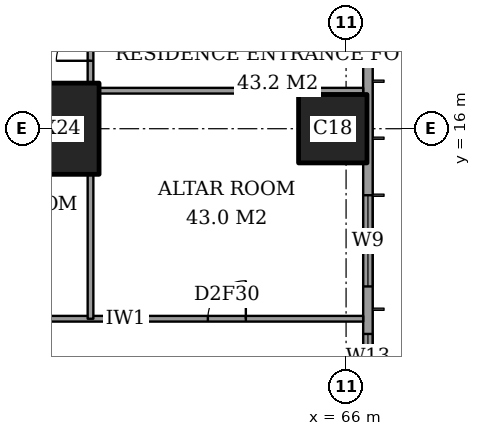
"""IFC4 building model, lengths in metres.
Left out: names, types, materials, properties, quantities, classifications, styles, units other than length and angle.
Written with IfcOpenShell. Run it as: python <this file> out.ifc"""

import sys

from ifc_helpers import new_model, si_unit, direction, frame, frame_2d, origin, origin_2d, place, context, subcontext, project, spatial, rectangle, extrude, element, fill, save


model = new_model("IFC4")
c1 = context("Model", 3, precision=1e-05, world=origin(), true_north=direction((0.0, 1.0)))
c2 = subcontext(c1, "Body", "Model", "MODEL_VIEW")
j1 = project(units=[si_unit("LENGTHUNIT", "METRE"), si_unit("PLANEANGLEUNIT", "RADIAN")], contexts=[c1])
p1 = place(None, origin())
s1 = spatial("IfcSite", under=j1, at=p1, CompositionType="ELEMENT")
p2 = place(p1, origin())
s2 = spatial("IfcBuilding", under=s1, at=p2, CompositionType="ELEMENT")
p3 = place(p2, frame((0.0, 0.0, 211.0)))
s3 = spatial("IfcBuildingStorey", under=s2, at=p3, CompositionType="ELEMENT", Elevation=211.0)
p4 = place(p3, frame((58.0, 16.0, 0.0), z_axis=(0.0, 0.0, 1.0), x_axis=(1.0, 0.0, 0.0)))
e1 = element("IfcColumn", 1, at=p4, inside=s3, PredefinedType="COLUMN", context=c2, shape_type="SweptSolid", body=[
    extrude(rectangle(XDim=3.0, YDim=2.4, at=origin_2d()), origin(), (0.0, 0.0, 1.0), 3.6),
])
p5 = place(p3, frame((65.65, 16.0, 0.0), z_axis=(0.0, 0.0, 1.0), x_axis=(1.0, 0.0, 0.0)))
e2 = element("IfcColumn", 2, at=p5, inside=s3, PredefinedType="COLUMN", context=c2, shape_type="SweptSolid", body=[
    extrude(rectangle(XDim=1.8, YDim=1.8, at=origin_2d()), origin(), (0.0, 0.0, 1.0), 3.6),
])
p6 = place(p3, frame((66.575, 3.175, 0.0), z_axis=(0.0, 0.0, 1.0), x_axis=(0.0, 1.0, 0.0)))
e3 = element("IfcWall", 3, at=p6, inside=s3, PredefinedType="SOLIDWALL", context=c2, shape_type="SweptSolid", body=[
    extrude(rectangle(XDim=41.65, YDim=0.25, at=frame_2d((20.825, 0.0))), origin(), (0.0, 0.0, 1.0), 3.6),
])
p7 = place(p6, frame((0.825, 0.0, 0.2)))
e4 = element("IfcOpeningElement", 4, at=p7, cuts=e3, PredefinedType="OPENING", context=c2, shape_type="SweptSolid", body=[
    extrude(rectangle(XDim=2.4, YDim=2.4, at=frame_2d((1.2, 1.2))), frame((0.0, 0.135, 0.0), z_axis=(0.0, -1.0, 0.0), x_axis=(1.0, 0.0, 0.0)), (0.0, 0.0, 1.0), 0.27),
])
p8 = place(p6, frame((6.225, 0.0, 0.2)))
e5 = element("IfcOpeningElement", 5, at=p8, cuts=e3, PredefinedType="OPENING", context=c2, shape_type="SweptSolid", body=[
    extrude(rectangle(XDim=1.2, YDim=2.4, at=frame_2d((0.6, 1.2))), frame((0.0, 0.135, 0.0), z_axis=(0.0, -1.0, 0.0), x_axis=(1.0, 0.0, 0.0)), (0.0, 0.0, 1.0), 0.27),
])
p9 = place(p6, frame((8.675, 0.0, 0.2)))
e6 = element("IfcOpeningElement", 6, at=p9, cuts=e3, PredefinedType="OPENING", context=c2, shape_type="SweptSolid", body=[
    extrude(rectangle(XDim=2.4, YDim=2.4, at=frame_2d((1.2, 1.2))), frame((0.0, 0.135, 0.0), z_axis=(0.0, -1.0, 0.0), x_axis=(1.0, 0.0, 0.0)), (0.0, 0.0, 1.0), 0.27),
])
p10 = place(p6, frame((15.675, 0.0, 0.2)))
e7 = element("IfcOpeningElement", 7, at=p10, cuts=e3, PredefinedType="OPENING", context=c2, shape_type="SweptSolid", body=[
    extrude(rectangle(XDim=2.4, YDim=2.4, at=frame_2d((1.2, 1.2))), frame((0.0, 0.135, 0.0), z_axis=(0.0, -1.0, 0.0), x_axis=(1.0, 0.0, 0.0)), (0.0, 0.0, 1.0), 0.27),
])
p11 = place(p6, frame((23.575, 0.0, 0.2)))
e8 = element("IfcOpeningElement", 8, at=p11, cuts=e3, PredefinedType="OPENING", context=c2, shape_type="SweptSolid", body=[
    extrude(rectangle(XDim=2.4, YDim=2.4, at=frame_2d((1.2, 1.2))), frame((0.0, 0.135, 0.0), z_axis=(0.0, -1.0, 0.0), x_axis=(1.0, 0.0, 0.0)), (0.0, 0.0, 1.0), 0.27),
])
p12 = place(p6, frame((30.775, 0.0, 0.2)))
e9 = element("IfcOpeningElement", 9, at=p12, cuts=e3, PredefinedType="OPENING", context=c2, shape_type="SweptSolid", body=[
    extrude(rectangle(XDim=2.4, YDim=2.4, at=frame_2d((1.2, 1.2))), frame((0.0, 0.135, 0.0), z_axis=(0.0, -1.0, 0.0), x_axis=(1.0, 0.0, 0.0)), (0.0, 0.0, 1.0), 0.27),
])
p13 = place(p6, frame((34.55, 0.0, 0.2)))
e10 = element("IfcOpeningElement", 10, at=p13, cuts=e3, PredefinedType="OPENING", context=c2, shape_type="SweptSolid", body=[
    extrude(rectangle(XDim=1.2, YDim=2.4, at=frame_2d((0.6, 1.2))), frame((0.0, 0.135, 0.0), z_axis=(0.0, -1.0, 0.0), x_axis=(1.0, 0.0, 0.0)), (0.0, 0.0, 1.0), 0.27),
])
p14 = place(p6, frame((38.425, 0.0, 0.2)))
e11 = element("IfcOpeningElement", 11, at=p14, cuts=e3, PredefinedType="OPENING", context=c2, shape_type="SweptSolid", body=[
    extrude(rectangle(XDim=2.4, YDim=2.4, at=frame_2d((1.2, 1.2))), frame((0.0, 0.135, 0.0), z_axis=(0.0, -1.0, 0.0), x_axis=(1.0, 0.0, 0.0)), (0.0, 0.0, 1.0), 0.27),
])
p15 = place(p3, frame((41.439, 11.0, 0.0), z_axis=(0.0, 0.0, 1.0), x_axis=(1.0, 0.0, 0.0)))
e12 = element("IfcWall", 12, at=p15, inside=s3, PredefinedType="PARTITIONING", context=c2, shape_type="SweptSolid", body=[
    extrude(rectangle(XDim=25.011, YDim=0.15, at=frame_2d((12.505, 0.0))), origin(), (0.0, 0.0, 1.0), 3.35),
])
p16 = place(p15, frame((12.361, 0.0, 0.0)))
e13 = element("IfcOpeningElement", 13, at=p16, cuts=e12, PredefinedType="OPENING", context=c2, shape_type="SweptSolid", body=[
    extrude(rectangle(XDim=1.0, YDim=2.1, at=frame_2d((0.5, 1.05))), frame((0.0, 0.085, 0.0), z_axis=(0.0, -1.0, 0.0), x_axis=(1.0, 0.0, 0.0)), (0.0, 0.0, 1.0), 0.17),
])
p17 = place(p15, frame((20.924, 0.0, 0.0)))
e14 = element("IfcOpeningElement", 14, at=p17, cuts=e12, PredefinedType="OPENING", context=c2, shape_type="SweptSolid", body=[
    extrude(rectangle(XDim=1.0, YDim=2.1, at=frame_2d((0.5, 1.05))), frame((0.0, 0.085, 0.0), z_axis=(0.0, -1.0, 0.0), x_axis=(1.0, 0.0, 0.0)), (0.0, 0.0, 1.0), 0.17),
])
p18 = place(p15, frame((15.448, 0.0, 0.0)))
e15 = element("IfcOpeningElement", 15, at=p18, cuts=e12, PredefinedType="OPENING", context=c2, shape_type="SweptSolid", body=[
    extrude(rectangle(XDim=0.9, YDim=2.1, at=frame_2d((0.45, 1.05))), frame((0.0, 0.085, 0.0), z_axis=(0.0, -1.0, 0.0), x_axis=(1.0, 0.0, 0.0)), (0.0, 0.0, 1.0), 0.17),
])
p19 = place(p15, frame((9.961, 0.0, 0.0)))
e16 = element("IfcOpeningElement", 16, at=p19, cuts=e12, PredefinedType="OPENING", context=c2, shape_type="SweptSolid", body=[
    extrude(rectangle(XDim=1.0, YDim=2.1, at=frame_2d((0.5, 1.05))), frame((0.0, 0.085, 0.0), z_axis=(0.0, -1.0, 0.0), x_axis=(1.0, 0.0, 0.0)), (0.0, 0.0, 1.0), 0.17),
])
p20 = place(p15, frame((7.411, 0.0, 0.0)))
e17 = element("IfcOpeningElement", 17, at=p20, cuts=e12, PredefinedType="OPENING", context=c2, shape_type="SweptSolid", body=[
    extrude(rectangle(XDim=0.9, YDim=2.1, at=frame_2d((0.45, 1.05))), frame((0.0, 0.085, 0.0), z_axis=(0.0, -1.0, 0.0), x_axis=(1.0, 0.0, 0.0)), (0.0, 0.0, 1.0), 0.17),
])
p21 = place(p15, frame((2.836, 0.0, 0.0)))
e18 = element("IfcOpeningElement", 18, at=p21, cuts=e12, PredefinedType="OPENING", context=c2, shape_type="SweptSolid", body=[
    extrude(rectangle(XDim=1.0, YDim=2.1, at=frame_2d((0.5, 1.05))), frame((0.0, 0.085, 0.0), z_axis=(0.0, -1.0, 0.0), x_axis=(1.0, 0.0, 0.0)), (0.0, 0.0, 1.0), 0.17),
])
p22 = place(p3, frame((59.5, 17.0, 0.0), z_axis=(0.0, 0.0, 1.0), x_axis=(1.0, 0.0, 0.0)))
e19 = element("IfcWall", 19, at=p22, inside=s3, PredefinedType="PARTITIONING", context=c2, shape_type="SweptSolid", body=[
    extrude(rectangle(XDim=6.95, YDim=0.15, at=frame_2d((3.475, 0.0))), origin(), (0.0, 0.0, 1.0), 3.35),
])
p23 = place(p3, frame((59.275, 11.0, 0.0), z_axis=(0.0, 0.0, 1.0), x_axis=(0.0, 1.0, 0.0)))
e20 = element("IfcWall", 20, at=p23, inside=s3, PredefinedType="PARTITIONING", context=c2, shape_type="SweptSolid", body=[
    extrude(rectangle(XDim=3.8, YDim=0.15, at=frame_2d((1.9, 0.0))), origin(), (0.0, 0.0, 1.0), 3.35),
])
p24 = place(p3, frame((59.275, 17.2, 0.0), z_axis=(0.0, 0.0, 1.0), x_axis=(0.0, 1.0, 0.0)))
e21 = element("IfcWall", 21, at=p24, inside=s3, PredefinedType="PARTITIONING", context=c2, shape_type="SweptSolid", body=[
    extrude(rectangle(XDim=2.45, YDim=0.15, at=frame_2d((1.225, 0.0))), origin(), (0.0, 0.0, 1.0), 3.35),
])
p25 = place(p24, frame((0.587, 0.0, 0.0)))
e22 = element("IfcOpeningElement", 22, at=p25, cuts=e21, PredefinedType="OPENING", context=c2, shape_type="SweptSolid", body=[
    extrude(rectangle(XDim=0.9, YDim=2.1, at=frame_2d((0.45, 1.05))), frame((0.0, 0.085, 0.0), z_axis=(0.0, -1.0, 0.0), x_axis=(1.0, 0.0, 0.0)), (0.0, 0.0, 1.0), 0.17),
])
p26 = place(p8, origin())
e23 = element("IfcWindow", 23, at=p26, inside=s3, PartitioningType="SINGLE_PANEL", PredefinedType="WINDOW", context=c2, shape_type="SweptSolid", body=[
    extrude(rectangle(XDim=1.2, YDim=2.4, at=frame_2d((0.6, 1.2))), frame((0.0, 0.03, 0.0), z_axis=(0.0, -1.0, 0.0), x_axis=(1.0, 0.0, 0.0)), (0.0, 0.0, 1.0), 0.06),
])
fill(e5, e23)
p27 = place(p9, origin())
e24 = element("IfcWindow", 24, at=p27, inside=s3, PartitioningType="SINGLE_PANEL", PredefinedType="WINDOW", context=c2, shape_type="SweptSolid", body=[
    extrude(rectangle(XDim=2.4, YDim=2.4, at=frame_2d((1.2, 1.2))), frame((0.0, 0.03, 0.0), z_axis=(0.0, -1.0, 0.0), x_axis=(1.0, 0.0, 0.0)), (0.0, 0.0, 1.0), 0.06),
])
fill(e6, e24)
p28 = place(p17, origin())
e25 = element("IfcDoor", 25, at=p28, inside=s3, OperationType="SINGLE_SWING_LEFT", PredefinedType="DOOR", context=c2, shape_type="SweptSolid", body=[
    extrude(rectangle(XDim=1.0, YDim=2.1, at=frame_2d((0.5, 1.05))), frame((0.0, 0.025, 0.0), z_axis=(0.0, -1.0, 0.0), x_axis=(1.0, 0.0, 0.0)), (0.0, 0.0, 1.0), 0.05),
])
fill(e14, e25)
p29 = place(p25, origin())
e26 = element("IfcDoor", 26, at=p29, inside=s3, OperationType="SINGLE_SWING_RIGHT", PredefinedType="DOOR", context=c2, shape_type="SweptSolid", body=[
    extrude(rectangle(XDim=0.9, YDim=2.1, at=frame_2d((0.45, 1.05))), frame((0.0, 0.025, 0.0), z_axis=(0.0, -1.0, 0.0), x_axis=(1.0, 0.0, 0.0)), (0.0, 0.0, 1.0), 0.05),
])
fill(e22, e26)
save(model, sys.argv[1])
